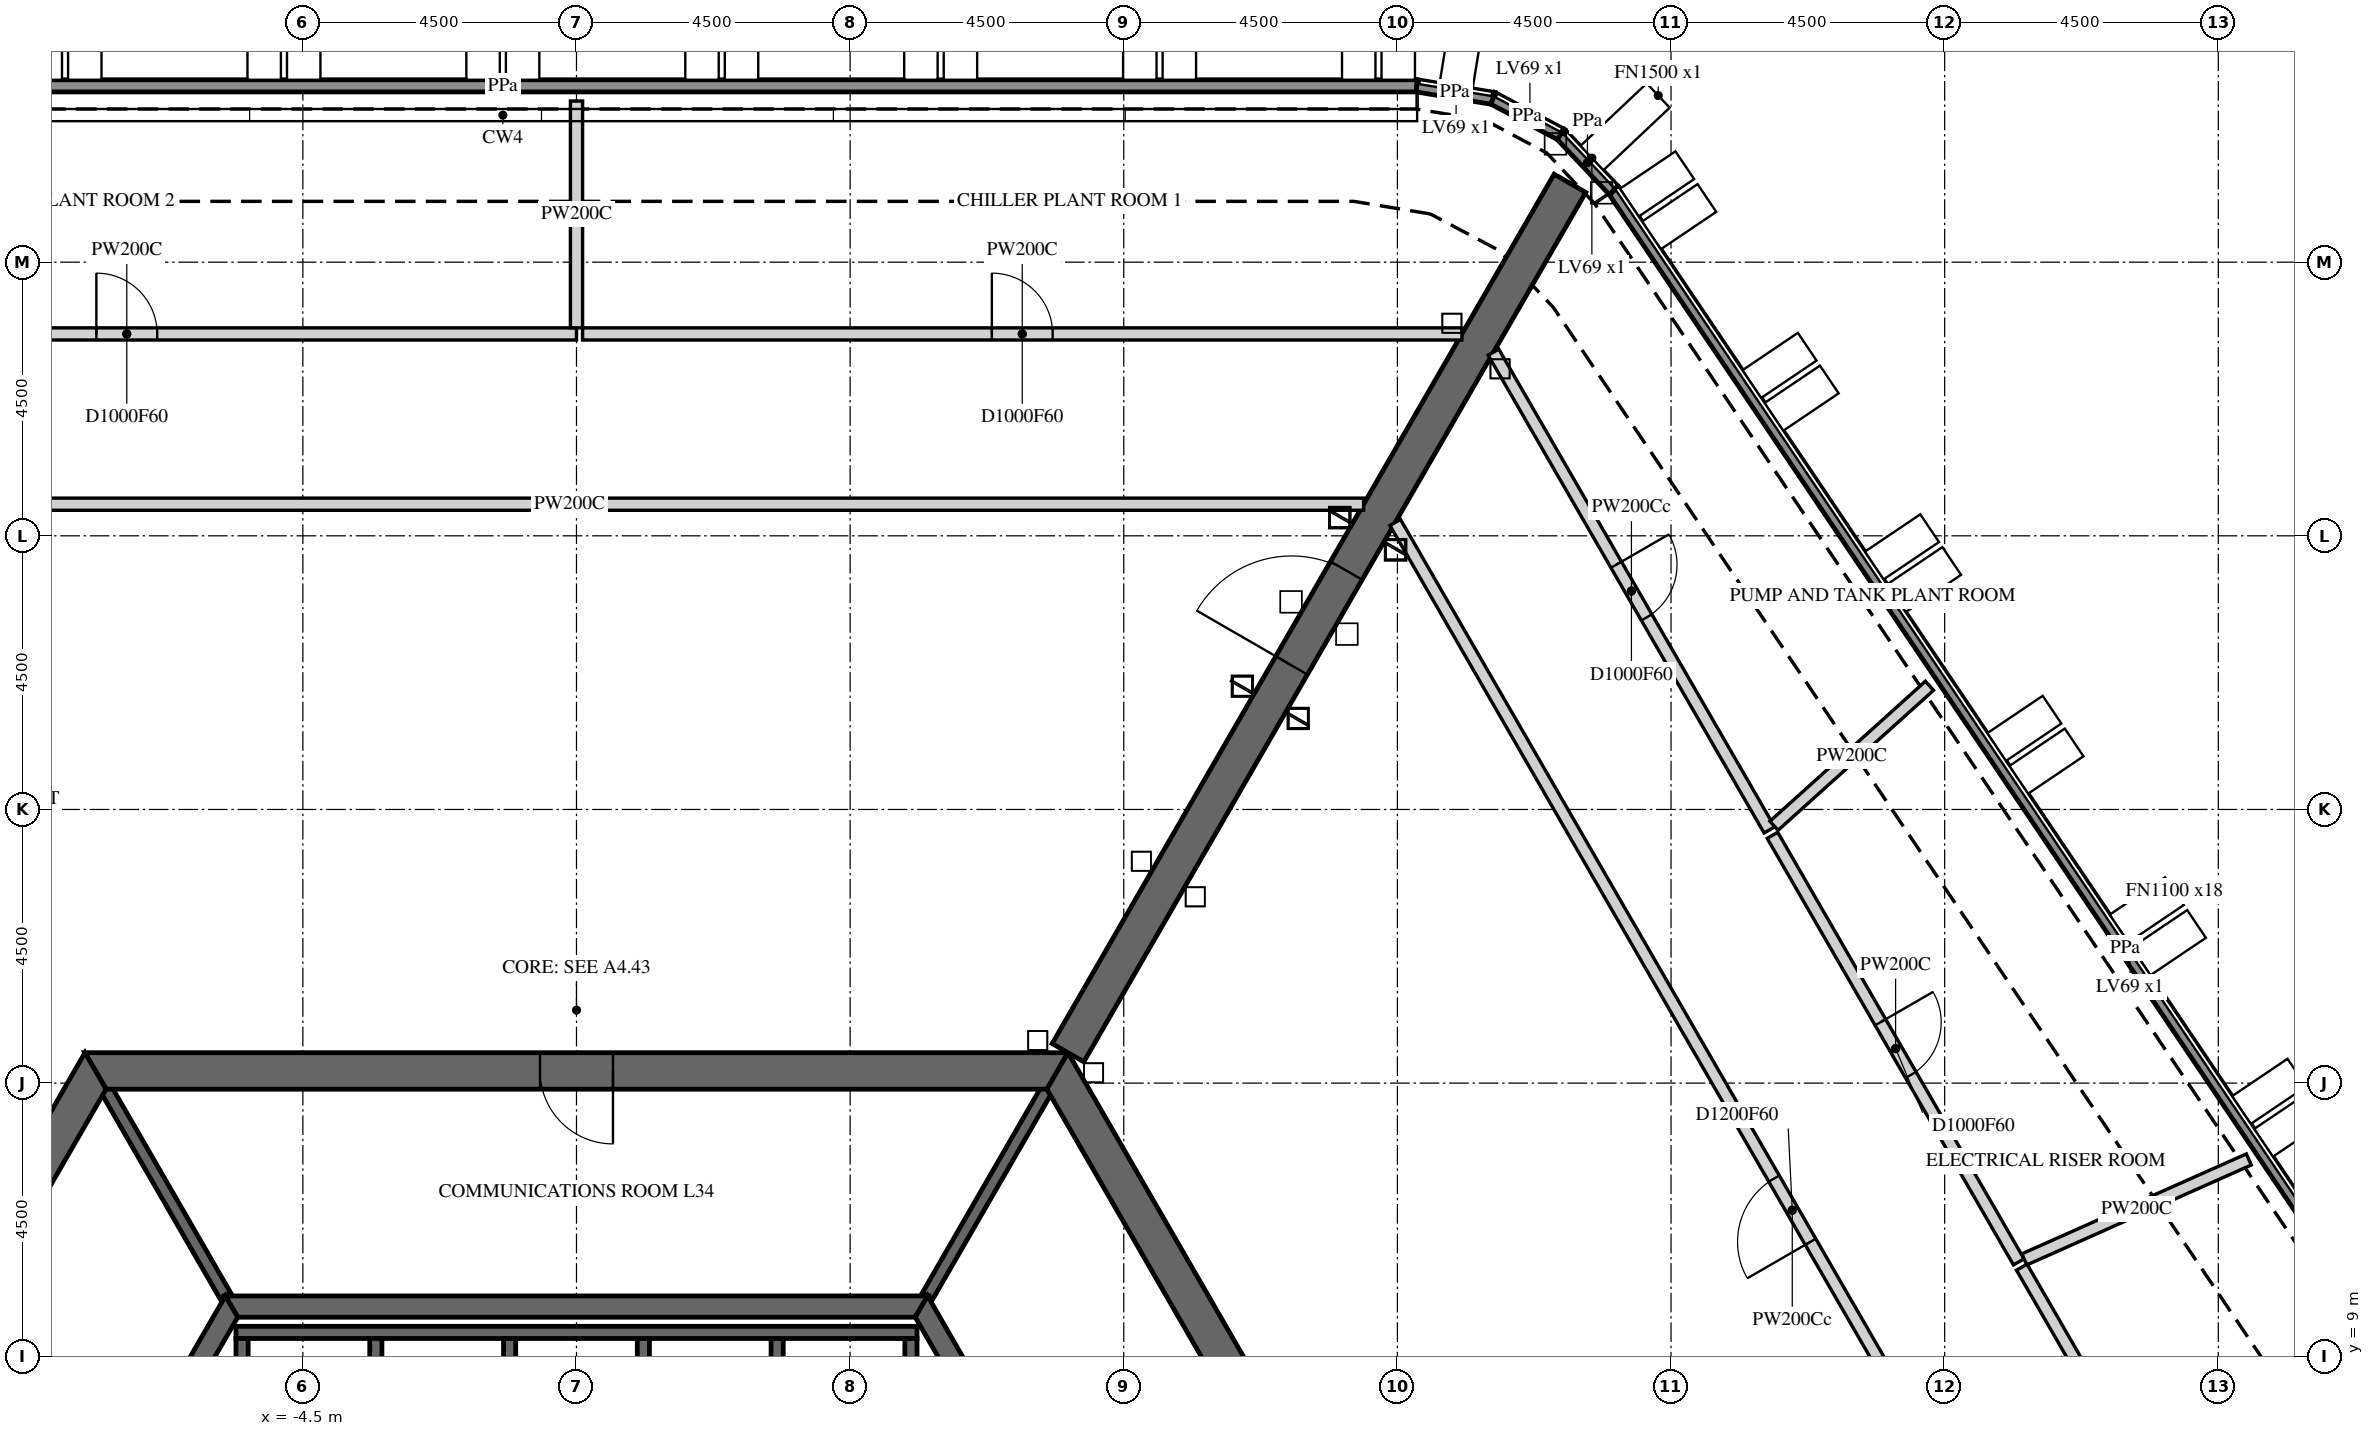
"""IFC4 building model, lengths in metres.
Left out: names, types, materials, properties, quantities, classifications, styles, units other than length and angle.
Written with IfcOpenShell. Run it as: python <this file> out.ifc"""

import sys

from ifc_helpers import new_model, si_unit, direction, frame, frame_2d, origin, place, context, subcontext, project, spatial, polyline, rectangle, outline, extrude, element, fill, save


model = new_model("IFC4")
c1 = context("Model", 3, precision=1e-05, world=origin(), true_north=direction((0.0, 1.0)))
c2 = subcontext(c1, "Body", "Model", "MODEL_VIEW")
j1 = project(units=[si_unit("LENGTHUNIT", "METRE"), si_unit("PLANEANGLEUNIT", "RADIAN")], contexts=[c1])
p1 = place(None, origin())
s1 = spatial("IfcSite", under=j1, at=p1, CompositionType="ELEMENT")
p2 = place(p1, origin())
s2 = spatial("IfcBuilding", under=s1, at=p2, CompositionType="ELEMENT")
p3 = place(p2, frame((0.0, 0.0, 146.7)))
s3 = spatial("IfcBuildingStorey", under=s2, at=p3, CompositionType="ELEMENT", Elevation=146.7)
p4 = place(p3, frame((13.816, 29.9, 5.7), z_axis=(0.0, 0.0, 1.0), x_axis=(0.986779937267, -0.162065898346, 0.0)))
e1 = element("IfcWall", 1, at=p4, inside=s3, PredefinedType="PARAPET", context=c2, shape_type="SweptSolid", body=[
    extrude(outline(polyline([(0.008, -0.1), (1.257, -0.1), (1.289, 0.1), (-0.008, 0.1), (0.008, -0.1)])), origin(), (0.0, 0.0, 1.0), 1.1),
])
p5 = place(p3, frame((15.072, 29.694, 5.7), z_axis=(0.0, 0.0, 1.0), x_axis=(0.88290815292, -0.469545731008, 0.0)))
e2 = element("IfcWall", 2, at=p5, inside=s3, PredefinedType="PARAPET", context=c2, shape_type="SweptSolid", body=[
    extrude(outline(polyline([(0.016, -0.1), (1.248, -0.1), (1.281, 0.1), (-0.016, 0.1), (0.016, -0.1)])), origin(), (0.0, 0.0, 1.0), 1.1),
])
p6 = place(p3, frame((16.189, 29.1, 5.7), z_axis=(0.0, 0.0, 1.0), x_axis=(0.686285527981, -0.727332230885, 0.0)))
e3 = element("IfcWall", 3, at=p6, inside=s3, PredefinedType="PARAPET", context=c2, shape_type="SweptSolid", body=[
    extrude(outline(polyline([(0.016, -0.1), (1.265, -0.1), (1.281, 0.1), (-0.016, 0.1), (0.016, -0.1)])), origin(), (0.0, 0.0, 1.0), 1.1),
])
p7 = place(p3, frame((17.062, 28.174, 5.7), z_axis=(0.0, 0.0, 1.0), x_axis=(0.559191272145, -0.829038672896, 0.0)))
e4 = element("IfcWall", 4, at=p7, inside=s3, PredefinedType="PARAPET", context=c2, shape_type="SweptSolid", body=[
    extrude(outline(polyline([(0.008, -0.1), (30.044, -0.1), (30.063, 0.1), (-0.008, 0.1), (0.008, -0.1)])), origin(), (0.0, 0.0, 1.0), 1.1),
])
p8 = place(p3, frame((-16.237, 29.9, 5.7), z_axis=(0.0, 0.0, 1.0), x_axis=(1.0, 0.0, 0.0)))
e5 = element("IfcWall", 5, at=p8, inside=s3, PredefinedType="PARAPET", context=c2, shape_type="SweptSolid", body=[
    extrude(outline(polyline([(0.009, -0.1), (30.045, -0.1), (30.062, 0.1), (-0.009, 0.1), (0.009, -0.1)])), origin(), (0.0, 0.0, 1.0), 1.1),
])
p9 = place(p3, frame((-7.91, 13.7, -0.3), z_axis=(0.0, 0.0, 1.0), x_axis=(-0.499999880136, -0.866025472988, 0.0)))
e6 = element("IfcWall", 6, at=p9, inside=s3, PredefinedType="SHEAR", context=c2, shape_type="SweptSolid", body=[
    extrude(outline(polyline([(-0.173, -0.3), (15.993, -0.3), (15.646, 0.3), (0.173, 0.3), (-0.173, -0.3)])), origin(), (0.0, 0.0, 1.0), 5.8),
])
p10 = place(p9, frame((7.039, 0.0, 0.3)))
e7 = element("IfcOpeningElement", 7, at=p10, cuts=e6, PredefinedType="OPENING", context=c2, shape_type="SweptSolid", body=[
    extrude(rectangle(XDim=1.8, YDim=2.4, at=frame_2d((0.9, 1.2))), frame((0.0, 0.31, 0.0), z_axis=(0.0, -1.0, 0.0), x_axis=(1.0, 0.0, 0.0)), (0.0, 0.0, 1.0), 0.62),
])
p11 = place(p3, frame((15.819, 0.0, -0.3), z_axis=(0.0, 0.0, 1.0), x_axis=(-0.499999880136, 0.866025472988, 0.0)))
e8 = element("IfcWall", 8, at=p11, inside=s3, PredefinedType="SHEAR", context=c2, shape_type="SweptSolid", body=[
    extrude(outline(polyline([(-0.173, -0.3), (15.993, -0.3), (15.646, 0.3), (0.173, 0.3), (-0.173, -0.3)])), origin(), (0.0, 0.0, 1.0), 5.8),
])
p12 = place(p11, frame((6.981, 0.0, 0.3)))
e9 = element("IfcOpeningElement", 9, at=p12, cuts=e8, PredefinedType="OPENING", context=c2, shape_type="SweptSolid", body=[
    extrude(rectangle(XDim=1.8, YDim=2.4, at=frame_2d((0.9, 1.2))), frame((0.0, 0.31, 0.0), z_axis=(0.0, -1.0, 0.0), x_axis=(1.0, 0.0, 0.0)), (0.0, 0.0, 1.0), 0.62),
])
p13 = place(p3, frame((7.91, 13.7, -0.3), z_axis=(0.0, 0.0, 1.0), x_axis=(-1.0, 0.0, 0.0)))
e10 = element("IfcWall", 10, at=p13, inside=s3, PredefinedType="SHEAR", context=c2, shape_type="SweptSolid", body=[
    extrude(outline(polyline([(-0.173, -0.3), (15.993, -0.3), (15.646, 0.3), (0.173, 0.3), (-0.173, -0.3)])), origin(), (0.0, 0.0, 1.0), 5.8),
])
p14 = place(p13, frame((7.31, 0.0, 0.3)))
e11 = element("IfcOpeningElement", 11, at=p14, cuts=e10, PredefinedType="OPENING", context=c2, shape_type="SweptSolid", body=[
    extrude(rectangle(XDim=1.2, YDim=2.4, at=frame_2d((0.6, 1.2))), frame((0.0, 0.31, 0.0), z_axis=(0.0, -1.0, 0.0), x_axis=(1.0, 0.0, 0.0)), (0.0, 0.0, 1.0), 0.62),
])
p15 = place(p3, frame((8.083, 14.0, -0.3), z_axis=(0.0, 0.0, 1.0), x_axis=(0.499997680643, 0.866026742862, 0.0)))
e12 = element("IfcWall", 12, at=p15, inside=s3, PredefinedType="SHEAR", context=c2, shape_type="SweptSolid", body=[
    extrude(rectangle(XDim=16.509, YDim=0.6, at=frame_2d((8.254, 0.0))), origin(), (0.0, 0.0, 1.0), 5.8),
])
p16 = place(p15, frame((7.354, 0.0, 0.3)))
e13 = element("IfcOpeningElement", 13, at=p16, cuts=e12, PredefinedType="OPENING", context=c2, shape_type="SweptSolid", body=[
    extrude(rectangle(XDim=1.8, YDim=2.4, at=frame_2d((0.9, 1.2))), frame((0.0, 0.31, 0.0), z_axis=(0.0, -1.0, 0.0), x_axis=(1.0, 0.0, 0.0)), (0.0, 0.0, 1.0), 0.62),
])
p17 = place(p3, frame((-5.673, 9.825, -0.3), z_axis=(0.0, 0.0, 1.0), x_axis=(-0.499995046907, -0.866028263435, 0.0)))
e14 = element("IfcWall", 14, at=p17, inside=s3, PredefinedType="SHEAR", context=c2, shape_type="SweptSolid", body=[
    extrude(outline(polyline([(-0.101, -0.175), (11.446, -0.175), (11.244, 0.175), (0.101, 0.175), (-0.101, -0.175)])), origin(), (0.0, 0.0, 1.0), 5.8),
])
p18 = place(p17, frame((4.801, 0.0, 0.3)))
e15 = element("IfcOpeningElement", 15, at=p18, cuts=e14, PredefinedType="OPENING", context=c2, shape_type="SweptSolid", body=[
    extrude(rectangle(XDim=1.8, YDim=2.4, at=frame_2d((0.9, 1.2))), frame((0.0, 0.185, 0.0), z_axis=(0.0, -1.0, 0.0), x_axis=(1.0, 0.0, 0.0)), (0.0, 0.0, 1.0), 0.37),
])
p19 = place(p3, frame((11.345, 0.0, -0.3), z_axis=(0.0, 0.0, 1.0), x_axis=(-0.499995046907, 0.866028263435, 0.0)))
e16 = element("IfcWall", 16, at=p19, inside=s3, PredefinedType="SHEAR", context=c2, shape_type="SweptSolid", body=[
    extrude(outline(polyline([(-0.101, -0.175), (11.446, -0.175), (11.244, 0.175), (0.101, 0.175), (-0.101, -0.175)])), origin(), (0.0, 0.0, 1.0), 5.8),
])
p20 = place(p19, frame((4.744, 0.0, 0.3)))
e17 = element("IfcOpeningElement", 17, at=p20, cuts=e16, PredefinedType="OPENING", context=c2, shape_type="SweptSolid", body=[
    extrude(rectangle(XDim=1.8, YDim=2.4, at=frame_2d((0.9, 1.2))), frame((0.0, 0.185, 0.0), z_axis=(0.0, -1.0, 0.0), x_axis=(1.0, 0.0, 0.0)), (0.0, 0.0, 1.0), 0.37),
])
p21 = place(p3, frame((5.673, 9.825, -0.3), z_axis=(0.0, 0.0, 1.0), x_axis=(-1.0, 0.0, 0.0)))
e18 = element("IfcWall", 18, at=p21, inside=s3, PredefinedType="SHEAR", context=c2, shape_type="SweptSolid", body=[
    extrude(outline(polyline([(-0.101, -0.175), (11.446, -0.175), (11.244, 0.175), (0.101, 0.175), (-0.101, -0.175)])), origin(), (0.0, 0.0, 1.0), 5.8),
])
p22 = place(p3, frame((-5.6, 9.4, -0.25), z_axis=(0.0, 0.0, 1.0), x_axis=(1.0, 0.0, 0.0)))
e19 = element("IfcWall", 19, at=p22, inside=s3, PredefinedType="SHEAR", context=c2, shape_type="SweptSolid", body=[
    extrude(rectangle(XDim=11.2, YDim=0.2, at=frame_2d((5.6, 0.0))), origin(), (0.0, 0.0, 1.0), 5.75),
])
for number, where, z_axis, x_axis in (
    (20, (-5.5, 6.4, -0.25), (0.0, 0.0, 1.0), (0.0, 1.0, 0.0)),
    (21, (-3.3, 6.4, -0.25), (0.0, 0.0, 1.0), (0.0, 1.0, 0.0)),
    (22, (-1.1, 6.4, -0.25), (0.0, 0.0, 1.0), (0.0, 1.0, 0.0)),
    (23, (1.1, 6.4, -0.25), (0.0, 0.0, 1.0), (0.0, 1.0, 0.0)),
    (24, (3.3, 6.4, -0.25), (0.0, 0.0, 1.0), (0.0, 1.0, 0.0)),
    (25, (5.5, 6.4, -0.25), (0.0, 0.0, 1.0), (0.0, 1.0, 0.0)),
):
    element("IfcWall", number, at=place(p3, frame(where, z_axis=z_axis, x_axis=x_axis)), inside=s3, PredefinedType="SHEAR", context=c2, shape_type="SweptSolid", body=[
        extrude(rectangle(XDim=2.9, YDim=0.2, at=frame_2d((1.45, 0.0))), origin(), (0.0, 0.0, 1.0), 5.75),
    ])
for number, where, z_axis, x_axis in (
    (26, (5.773, 10.0, -0.3), (0.0, 0.0, 1.0), (0.5, 0.866, 0.0)),
    (27, (-5.773, 10.0, -0.3), (0.0, 0.0, 1.0), (-0.5, 0.866, 0.0)),
):
    element("IfcWall", number, at=place(p3, frame(where, z_axis=z_axis, x_axis=x_axis)), inside=s3, PredefinedType="SHEAR", context=c2, shape_type="SweptSolid", body=[
        extrude(rectangle(XDim=3.926, YDim=0.2, at=frame_2d((1.963, 0.0))), origin(), (0.0, 0.0, 1.0), 5.8),
    ])
p23 = place(p3, frame((-14.792, 25.82, 0.0), z_axis=(0.0, 0.0, 1.0), x_axis=(1.0, 0.0, 0.0)))
e28 = element("IfcWall", 28, at=p23, inside=s3, PredefinedType="PARTITIONING", context=c2, shape_type="SweptSolid", body=[
    extrude(rectangle(XDim=14.792, YDim=0.2, at=frame_2d((7.396, 0.0))), origin(), (0.0, 0.0, 1.0), 5.5),
])
p24 = place(p23, frame((6.896, 0.0, 0.0)))
e29 = element("IfcOpeningElement", 29, at=p24, cuts=e28, PredefinedType="OPENING", context=c2, shape_type="SweptSolid", body=[
    extrude(rectangle(XDim=1.0, YDim=2.1, at=frame_2d((0.5, 1.05))), frame((0.0, 0.11, 0.0), z_axis=(0.0, -1.0, 0.0), x_axis=(1.0, 0.0, 0.0)), (0.0, 0.0, 1.0), 0.22),
])
p25 = place(p3, frame((0.0, 29.65, 0.0), z_axis=(0.0, 0.0, 1.0), x_axis=(0.0, -1.0, 0.0)))
e30 = element("IfcWall", 30, at=p25, inside=s3, PredefinedType="PARTITIONING", context=c2, shape_type="SweptSolid", body=[
    extrude(rectangle(XDim=3.73, YDim=0.2, at=frame_2d((1.865, 0.0))), origin(), (0.0, 0.0, 1.0), 5.5),
])
p26 = place(p3, frame((12.944, 23.02, 0.0), z_axis=(0.0, 0.0, 1.0), x_axis=(-1.0, 0.0, 0.0)))
e31 = element("IfcWall", 31, at=p26, inside=s3, PredefinedType="PARTITIONING", context=c2, shape_type="SweptSolid", body=[
    extrude(rectangle(XDim=26.12, YDim=0.2, at=frame_2d((13.06, 0.0))), origin(), (0.0, 0.0, 1.0), 5.5),
])
p27 = place(p3, frame((0.1, 25.82, 0.0), z_axis=(0.0, 0.0, 1.0), x_axis=(1.0, 0.0, 0.0)))
e32 = element("IfcWall", 32, at=p27, inside=s3, PredefinedType="PARTITIONING", context=c2, shape_type="SweptSolid", body=[
    extrude(rectangle(XDim=14.461, YDim=0.2, at=frame_2d((7.23, 0.0))), origin(), (0.0, 0.0, 1.0), 5.5),
])
p28 = place(p27, frame((6.73, 0.0, 0.0)))
e33 = element("IfcOpeningElement", 33, at=p28, cuts=e32, PredefinedType="OPENING", context=c2, shape_type="SweptSolid", body=[
    extrude(rectangle(XDim=1.0, YDim=2.1, at=frame_2d((0.5, 1.05))), frame((0.0, 0.11, 0.0), z_axis=(0.0, -1.0, 0.0), x_axis=(1.0, 0.0, 0.0)), (0.0, 0.0, 1.0), 0.22),
])
p29 = place(p3, frame((15.08, 25.52, 0.0), z_axis=(0.0, 0.0, 1.0), x_axis=(0.50005476547, -0.865993782617, 0.0)))
e34 = element("IfcWall", 34, at=p29, inside=s3, PredefinedType="PARTITIONING", context=c2, shape_type="SweptSolid", body=[
    extrude(rectangle(XDim=9.073, YDim=0.2, at=frame_2d((4.536, 0.0))), origin(), (0.0, 0.0, 1.0), 4.573),
])
p30 = place(p29, frame((4.036, 0.0, 0.0)))
e35 = element("IfcOpeningElement", 35, at=p30, cuts=e34, PredefinedType="OPENING", context=c2, shape_type="SweptSolid", body=[
    extrude(rectangle(XDim=1.0, YDim=2.1, at=frame_2d((0.5, 1.05))), frame((0.0, 0.11, 0.0), z_axis=(0.0, -1.0, 0.0), x_axis=(1.0, 0.0, 0.0)), (0.0, 0.0, 1.0), 0.22),
])
p31 = place(p3, frame((22.25, 20.034, 0.0), z_axis=(0.0, 0.0, 1.0), x_axis=(-0.743075351074, -0.669207757446, 0.0)))
e36 = element("IfcWall", 36, at=p31, inside=s3, PredefinedType="PARTITIONING", context=c2, shape_type="SweptSolid", body=[
    extrude(rectangle(XDim=3.441, YDim=0.2, at=frame_2d((1.72, 0.0))), origin(), (0.0, 0.0, 1.0), 5.5),
])
p32 = place(p3, frame((19.668, 17.574, 0.0), z_axis=(0.0, 0.0, 1.0), x_axis=(0.50000337782, -0.86602345359, 0.0)))
e37 = element("IfcWall", 37, at=p32, inside=s3, PredefinedType="PARTITIONING", context=c2, shape_type="SweptSolid", body=[
    extrude(rectangle(XDim=8.1, YDim=0.2, at=frame_2d((4.05, 0.0))), origin(), (0.0, 0.0, 1.0), 5.5),
])
p33 = place(p32, frame((3.55, 0.0, 0.0)))
e38 = element("IfcOpeningElement", 38, at=p33, cuts=e37, PredefinedType="OPENING", context=c2, shape_type="SweptSolid", body=[
    extrude(rectangle(XDim=1.0, YDim=2.1, at=frame_2d((0.5, 1.05))), frame((0.0, 0.11, 0.0), z_axis=(0.0, -1.0, 0.0), x_axis=(1.0, 0.0, 0.0)), (0.0, 0.0, 1.0), 0.22),
])
p34 = place(p3, frame((26.523, 0.1, 0.0), z_axis=(0.0, 0.0, 1.0), x_axis=(-0.499985419657, 0.866033821586, 0.0)))
e39 = element("IfcWall", 39, at=p34, inside=s3, PredefinedType="PARTITIONING", context=c2, shape_type="SweptSolid", body=[
    extrude(rectangle(XDim=26.119, YDim=0.2, at=frame_2d((13.06, 0.0))), origin(), (0.0, 0.0, 1.0), 4.573),
])
p35 = place(p34, frame((12.459, 0.0, 0.0)))
e40 = element("IfcOpeningElement", 40, at=p35, cuts=e39, PredefinedType="OPENING", context=c2, shape_type="SweptSolid", body=[
    extrude(rectangle(XDim=1.2, YDim=2.1, at=frame_2d((0.6, 1.05))), frame((0.0, 0.11, 0.0), z_axis=(0.0, -1.0, 0.0), x_axis=(1.0, 0.0, 0.0)), (0.0, 0.0, 1.0), 0.22),
])
p36 = place(p3, frame((27.502, 12.244, 0.0), z_axis=(0.0, 0.0, 1.0), x_axis=(-0.913562251787, -0.406698920714, 0.0)))
e41 = element("IfcWall", 41, at=p36, inside=s3, PredefinedType="PARTITIONING", context=c2, shape_type="SweptSolid", body=[
    extrude(rectangle(XDim=4.041, YDim=0.2, at=frame_2d((2.021, 0.0))), origin(), (0.0, 0.0, 1.0), 5.5),
])
p37 = place(p3, frame((23.768, 10.473, 0.0), z_axis=(0.0, 0.0, 1.0), x_axis=(0.499955956564, -0.866050830781, 0.0)))
e42 = element("IfcWall", 42, at=p37, inside=s3, PredefinedType="PARTITIONING", context=c2, shape_type="SweptSolid", body=[
    extrude(rectangle(XDim=11.977, YDim=0.2, at=frame_2d((5.989, 0.0))), origin(), (0.0, 0.0, 1.0), 5.5),
])
p38 = place(p37, frame((5.489, 0.0, 0.0)))
e43 = element("IfcOpeningElement", 43, at=p38, cuts=e42, PredefinedType="OPENING", context=c2, shape_type="SweptSolid", body=[
    extrude(rectangle(XDim=1.0, YDim=2.1, at=frame_2d((0.5, 1.05))), frame((0.0, 0.11, 0.0), z_axis=(0.0, -1.0, 0.0), x_axis=(1.0, 0.0, 0.0)), (0.0, 0.0, 1.0), 0.22),
])
p39 = place(p14, origin())
e44 = element("IfcDoor", 44, at=p39, inside=s3, OperationType="SINGLE_SWING_LEFT", PredefinedType="DOOR", context=c2, shape_type="SweptSolid", body=[
    extrude(rectangle(XDim=1.2, YDim=2.4, at=frame_2d((0.6, 1.2))), frame((0.0, 0.025, 0.0), z_axis=(0.0, -1.0, 0.0), x_axis=(1.0, 0.0, 0.0)), (0.0, 0.0, 1.0), 0.05),
])
fill(e11, e44)
p40 = place(p16, origin())
e45 = element("IfcDoor", 45, at=p40, inside=s3, OperationType="DOUBLE_DOOR_SINGLE_SWING", PredefinedType="DOOR", context=c2, shape_type="SweptSolid", body=[
    extrude(rectangle(XDim=1.8, YDim=2.4, at=frame_2d((0.9, 1.2))), frame((0.0, 0.025, 0.0), z_axis=(0.0, -1.0, 0.0), x_axis=(1.0, 0.0, 0.0)), (0.0, 0.0, 1.0), 0.05),
])
fill(e13, e45)
p41 = place(p24, origin())
e46 = element("IfcDoor", 46, at=p41, inside=s3, OperationType="SINGLE_SWING_LEFT", PredefinedType="DOOR", context=c2, shape_type="SweptSolid", body=[
    extrude(rectangle(XDim=1.0, YDim=2.1, at=frame_2d((0.5, 1.05))), frame((0.0, 0.025, 0.0), z_axis=(0.0, -1.0, 0.0), x_axis=(1.0, 0.0, 0.0)), (0.0, 0.0, 1.0), 0.05),
])
fill(e29, e46)
p42 = place(p28, origin())
e47 = element("IfcDoor", 47, at=p42, inside=s3, OperationType="SINGLE_SWING_RIGHT", PredefinedType="DOOR", context=c2, shape_type="SweptSolid", body=[
    extrude(rectangle(XDim=1.0, YDim=2.1, at=frame_2d((0.5, 1.05))), frame((0.0, 0.025, 0.0), z_axis=(0.0, -1.0, 0.0), x_axis=(1.0, 0.0, 0.0)), (0.0, 0.0, 1.0), 0.05),
])
fill(e33, e47)
p43 = place(p30, origin())
e48 = element("IfcDoor", 48, at=p43, inside=s3, OperationType="SINGLE_SWING_RIGHT", PredefinedType="DOOR", context=c2, shape_type="SweptSolid", body=[
    extrude(rectangle(XDim=1.0, YDim=2.1, at=frame_2d((0.5, 1.05))), frame((0.0, 0.025, 0.0), z_axis=(0.0, -1.0, 0.0), x_axis=(1.0, 0.0, 0.0)), (0.0, 0.0, 1.0), 0.05),
])
fill(e35, e48)
p44 = place(p33, origin())
e49 = element("IfcDoor", 49, at=p44, inside=s3, OperationType="SINGLE_SWING_RIGHT", PredefinedType="DOOR", context=c2, shape_type="SweptSolid", body=[
    extrude(rectangle(XDim=1.0, YDim=2.1, at=frame_2d((0.5, 1.05))), frame((0.0, 0.025, 0.0), z_axis=(0.0, -1.0, 0.0), x_axis=(1.0, 0.0, 0.0)), (0.0, 0.0, 1.0), 0.05),
])
fill(e38, e49)
p45 = place(p35, origin())
e50 = element("IfcDoor", 50, at=p45, inside=s3, OperationType="SINGLE_SWING_LEFT", PredefinedType="DOOR", context=c2, shape_type="SweptSolid", body=[
    extrude(rectangle(XDim=1.2, YDim=2.1, at=frame_2d((0.6, 1.05))), frame((0.0, 0.025, 0.0), z_axis=(0.0, -1.0, 0.0), x_axis=(1.0, 0.0, 0.0)), (0.0, 0.0, 1.0), 0.05),
])
fill(e40, e50)
save(model, sys.argv[1])
